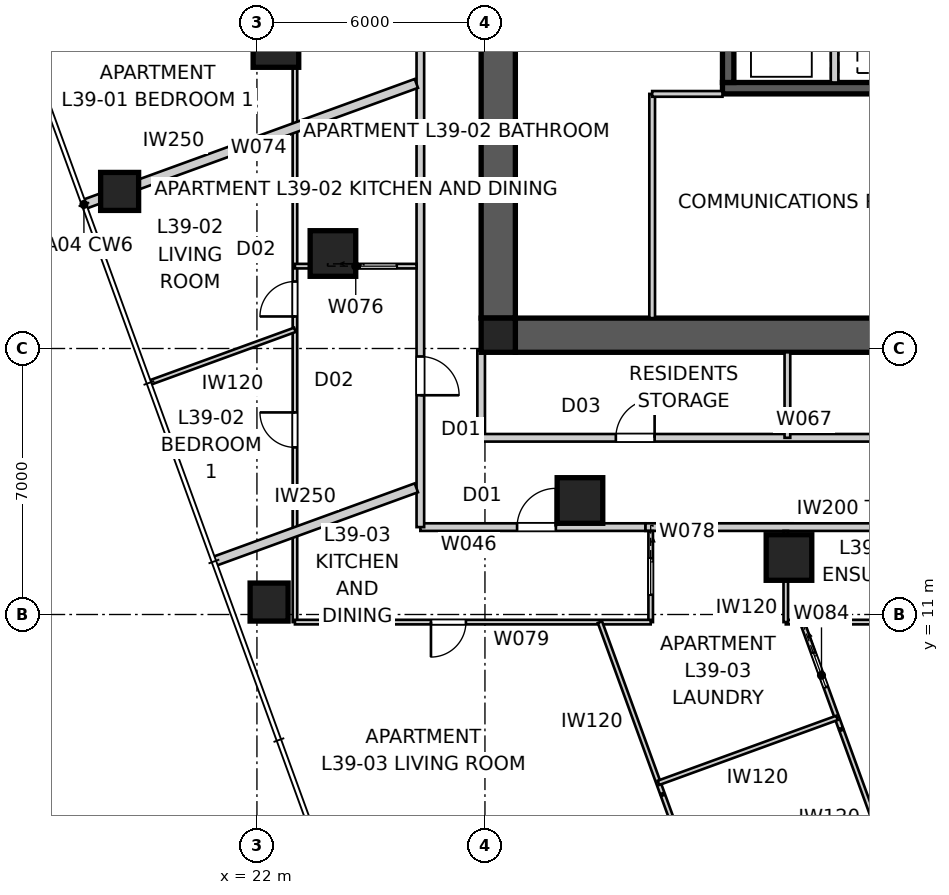
"""IFC4 building model, lengths in metres.
Left out: names, types, materials, properties, quantities, classifications, styles, units other than length and angle.
Written with IfcOpenShell. Run it as: python <this file> out.ifc"""

import sys

from ifc_helpers import new_model, si_unit, direction, frame, frame_2d, origin, origin_2d, place, context, subcontext, project, spatial, polyline, rectangle, outline, extrude, element, fill, save


model = new_model("IFC4")
c1 = context("Model", 3, precision=1e-05, world=origin(), true_north=direction((0.0, 1.0)))
c2 = subcontext(c1, "Body", "Model", "MODEL_VIEW")
j1 = project(units=[si_unit("LENGTHUNIT", "METRE"), si_unit("PLANEANGLEUNIT", "RADIAN")], contexts=[c1])
p1 = place(None, origin())
s1 = spatial("IfcSite", under=j1, at=p1, CompositionType="ELEMENT")
p2 = place(p1, origin())
s2 = spatial("IfcBuilding", under=s1, at=p2, CompositionType="ELEMENT")
p3 = place(p2, frame((0.0, 0.0, 143.8)))
s3 = spatial("IfcBuildingStorey", under=s2, at=p3, CompositionType="ELEMENT", Elevation=143.8)
p4 = place(p3, frame((51.2, 18.35, 0.0), z_axis=(0.0, 0.0, 1.0), x_axis=(-1.0, 0.0, 0.0)))
e1 = element("IfcWall", 1, at=p4, inside=s3, PredefinedType="SHEAR", context=c2, shape_type="SweptSolid", body=[
    extrude(outline(polyline([(0.0, -0.45), (22.4, -0.45), (22.4, -0.025), (22.85, -0.025), (22.85, 0.025), (22.4, 0.025), (22.4, 0.45), (0.0, 0.45), (0.0, 0.025), (-0.45, 0.025), (-0.45, -0.025), (0.0, -0.025), (0.0, -0.45)])), origin(), (0.0, 0.0, 1.0), 3.4),
])
p5 = place(p3, frame((28.35, 41.2, 0.0), z_axis=(0.0, 0.0, 1.0), x_axis=(0.0, -1.0, 0.0)))
e2 = element("IfcWall", 2, at=p5, inside=s3, PredefinedType="SHEAR", context=c2, shape_type="SweptSolid", body=[
    extrude(outline(polyline([(0.0, -0.45), (22.4, -0.45), (22.4, -0.025), (22.85, -0.025), (22.85, 0.025), (22.4, 0.025), (22.4, 0.45), (0.0, 0.45), (0.0, 0.025), (-0.45, 0.025), (-0.45, -0.025), (0.0, -0.025), (0.0, -0.45)])), origin(), (0.0, 0.0, 1.0), 3.4),
])
p6 = place(p5, frame((11.14, 0.0, 0.0)))
e3 = element("IfcOpeningElement", 3, at=p6, cuts=e2, PredefinedType="OPENING", context=c2, shape_type="SweptSolid", body=[
    extrude(rectangle(XDim=1.02, YDim=2.4, at=frame_2d((0.51, 1.2))), frame((0.0, 0.46, 0.0), z_axis=(0.0, -1.0, 0.0), x_axis=(1.0, 0.0, 0.0)), (0.0, 0.0, 1.0), 0.92),
])
p7 = place(p3, frame((45.75, 24.85, 0.0), z_axis=(0.0, 0.0, 1.0), x_axis=(-1.0, 0.0, 0.0)))
e4 = element("IfcWall", 4, at=p7, inside=s3, PredefinedType="SHEAR", context=c2, shape_type="SweptSolid", body=[
    extrude(rectangle(XDim=11.5, YDim=0.3, at=frame_2d((5.75, 0.0))), origin(), (0.0, 0.0, 1.0), 3.4),
])
p8 = place(p3, frame((37.2, 27.8, 0.0), z_axis=(0.0, 0.0, 1.0), x_axis=(0.0, -1.0, 0.0)))
e5 = element("IfcWall", 5, at=p8, inside=s3, PredefinedType="SOLIDWALL", context=c2, shape_type="SweptSolid", body=[
    extrude(rectangle(XDim=2.8, YDim=0.2, at=frame_2d((1.4, 0.0))), origin(), (0.0, 0.0, 1.0), 3.4),
])
p9 = place(p3, frame((34.4, 27.8, 0.0), z_axis=(0.0, 0.0, 1.0), x_axis=(0.0, -1.0, 0.0)))
e6 = element("IfcWall", 6, at=p9, inside=s3, PredefinedType="SHEAR", context=c2, shape_type="SweptSolid", body=[
    extrude(rectangle(XDim=2.8, YDim=0.3, at=frame_2d((1.4, 0.0))), origin(), (0.0, 0.0, 1.0), 3.4),
])
p10 = place(p3, frame((28.35, 18.35, 0.0), z_axis=(0.0, 0.0, 1.0), x_axis=(1.0, 0.0, 0.0)))
e7 = element("IfcColumn", 7, at=p10, inside=s3, PredefinedType="COLUMN", context=c2, shape_type="SweptSolid", body=[
    extrude(rectangle(XDim=0.9, YDim=0.9, at=origin_2d()), origin(), (0.0, 0.0, 1.0), 3.4),
])
for number, where, z_axis, x_axis in (
    (8, (18.387, 22.134, -0.15), (0.0, 0.0, 1.0), (1.0, 0.0, 0.0)),
    (9, (22.32, 11.327, -0.15), (0.0, 0.0, 1.0), (1.0, 0.0, 0.0)),
):
    element("IfcColumn", number, at=place(p3, frame(where, z_axis=z_axis, x_axis=x_axis)), inside=s3, PredefinedType="COLUMN", context=c2, shape_type="SweptSolid", body=[
        extrude(rectangle(XDim=1.0, YDim=1.0, at=origin_2d()), origin(), (0.0, 0.0, 1.0), 3.55),
    ])
for number, where, z_axis, x_axis in (
    (10, (22.5, 26.0, 0.0), (0.0, 0.0, 1.0), (1.0, 0.0, 0.0)),
    (11, (24.0, 20.5, 0.0), (0.0, 0.0, 1.0), (1.0, 0.0, 0.0)),
    (12, (30.5, 14.0, 0.0), (0.0, 0.0, 1.0), (1.0, 0.0, 0.0)),
    (13, (36.0, 12.5, 0.0), (0.0, 0.0, 1.0), (1.0, 0.0, 0.0)),
):
    element("IfcColumn", number, at=place(p3, frame(where, z_axis=z_axis, x_axis=x_axis)), inside=s3, PredefinedType="COLUMN", context=c2, shape_type="SweptSolid", body=[
        extrude(rectangle(XDim=1.2, YDim=1.2, at=origin_2d()), origin(), (0.0, 0.0, 1.0), 3.4),
    ])
p11 = place(p3, frame((26.3, 13.3, 0.0), z_axis=(0.0, 0.0, 1.0), x_axis=(1.0, 0.0, 0.0)))
e14 = element("IfcWall", 14, at=p11, inside=s3, PredefinedType="PARTITIONING", context=c2, shape_type="SweptSolid", body=[
    extrude(rectangle(XDim=5.925, YDim=0.2, at=frame_2d((2.962, 0.0))), origin(), (0.0, 0.0, 1.0), 3.25),
])
p12 = place(p11, frame((2.545, 0.0, 0.0)))
e15 = element("IfcOpeningElement", 15, at=p12, cuts=e14, PredefinedType="OPENING", context=c2, shape_type="SweptSolid", body=[
    extrude(rectangle(XDim=1.02, YDim=2.34, at=frame_2d((0.51, 1.17))), frame((0.0, 0.11, 0.0), z_axis=(0.0, -1.0, 0.0), x_axis=(1.0, 0.0, 0.0)), (0.0, 0.0, 1.0), 0.22),
])
p13 = place(p3, frame((32.225, 13.3, 0.0), z_axis=(0.0, 0.0, 1.0), x_axis=(1.0, 0.0, 0.0)))
e16 = element("IfcWall", 16, at=p13, inside=s3, PredefinedType="PARTITIONING", context=c2, shape_type="SweptSolid", body=[
    extrude(rectangle(XDim=1.684, YDim=0.2, at=frame_2d((0.842, 0.0))), origin(), (0.0, 0.0, 1.0), 2.55),
])
p14 = place(p3, frame((33.908, 13.3, 0.0), z_axis=(0.0, 0.0, 1.0), x_axis=(1.0, 0.0, 0.0)))
e17 = element("IfcWall", 17, at=p14, inside=s3, PredefinedType="PARTITIONING", context=c2, shape_type="SweptSolid", body=[
    extrude(rectangle(XDim=12.183, YDim=0.2, at=frame_2d((6.092, 0.0))), origin(), (0.0, 0.0, 1.0), 3.25),
])
p15 = place(p3, frame((26.3, 46.3, 0.0), z_axis=(0.0, 0.0, 1.0), x_axis=(0.0, -1.0, 0.0)))
e18 = element("IfcWall", 18, at=p15, inside=s3, PredefinedType="PARTITIONING", context=c2, shape_type="SweptSolid", body=[
    extrude(rectangle(XDim=33.0, YDim=0.2, at=frame_2d((16.5, 0.0))), origin(), (0.0, 0.0, 1.0), 3.25),
])
p16 = place(p15, frame((13.229, 0.0, 0.0)))
e19 = element("IfcOpeningElement", 19, at=p16, cuts=e18, PredefinedType="OPENING", context=c2, shape_type="SweptSolid", body=[
    extrude(rectangle(XDim=1.02, YDim=2.34, at=frame_2d((0.51, 1.17))), frame((0.0, 0.11, 0.0), z_axis=(0.0, -1.0, 0.0), x_axis=(1.0, 0.0, 0.0)), (0.0, 0.0, 1.0), 0.22),
])
p17 = place(p15, frame((28.51, 0.0, 0.0)))
e20 = element("IfcOpeningElement", 20, at=p17, cuts=e18, PredefinedType="OPENING", context=c2, shape_type="SweptSolid", body=[
    extrude(rectangle(XDim=1.02, YDim=2.34, at=frame_2d((0.51, 1.17))), frame((0.0, 0.11, 0.0), z_axis=(0.0, -1.0, 0.0), x_axis=(1.0, 0.0, 0.0)), (0.0, 0.0, 1.0), 0.22),
])
p18 = place(p15, frame((1.998, 0.0, 0.0)))
e21 = element("IfcOpeningElement", 21, at=p18, cuts=e18, PredefinedType="OPENING", context=c2, shape_type="SweptSolid", body=[
    extrude(rectangle(XDim=1.02, YDim=2.34, at=frame_2d((0.51, 1.17))), frame((0.0, 0.11, 0.0), z_axis=(0.0, -1.0, 0.0), x_axis=(1.0, 0.0, 0.0)), (0.0, 0.0, 1.0), 0.22),
])
p19 = place(p3, frame((17.447, 21.792, 0.0), z_axis=(0.0, 0.0, 1.0), x_axis=(0.939693071685, 0.342018904489, 0.0)))
e22 = element("IfcWall", 22, at=p19, inside=s3, PredefinedType="PARTITIONING", context=c2, shape_type="SweptSolid", body=[
    extrude(rectangle(XDim=9.309, YDim=0.25, at=frame_2d((4.654, 0.0))), origin(), (0.0, 0.0, 1.0), 3.25),
])
p20 = place(p3, frame((20.868, 12.395, 0.0), z_axis=(0.0, 0.0, 1.0), x_axis=(0.939690274876, 0.342026588591, 0.0)))
e23 = element("IfcWall", 23, at=p20, inside=s3, PredefinedType="PARTITIONING", context=c2, shape_type="SweptSolid", body=[
    extrude(rectangle(XDim=5.669, YDim=0.25, at=frame_2d((2.834, 0.0))), origin(), (0.0, 0.0, 1.0), 3.25),
])
p21 = place(p3, frame((32.4, 18.8, 0.0), z_axis=(0.0, 0.0, 1.0), x_axis=(0.0, 1.0, 0.0)))
e24 = element("IfcWall", 24, at=p21, inside=s3, PredefinedType="SOLIDWALL", context=c2, shape_type="SweptSolid", body=[
    extrude(rectangle(XDim=5.9, YDim=0.15, at=frame_2d((2.95, 0.0))), origin(), (0.0, 0.0, 1.0), 3.25),
])
p22 = place(p3, frame((32.4, 24.7, 0.0), z_axis=(0.0, 0.0, 1.0), x_axis=(1.0, 0.0, 0.0)))
e25 = element("IfcWall", 25, at=p22, inside=s3, PredefinedType="SOLIDWALL", context=c2, shape_type="SweptSolid", body=[
    extrude(rectangle(XDim=1.85, YDim=0.15, at=frame_2d((0.925, 0.0))), origin(), (0.0, 0.0, 1.0), 3.25),
])
p23 = place(p3, frame((27.9, 17.95, 0.0), z_axis=(0.0, 0.0, 1.0), x_axis=(0.0, -1.0, 0.0)))
e26 = element("IfcWall", 26, at=p23, inside=s3, PredefinedType="PARTITIONING", context=c2, shape_type="SweptSolid", body=[
    extrude(rectangle(XDim=2.3, YDim=0.2, at=frame_2d((1.15, 0.0))), origin(), (0.0, 0.0, 1.0), 3.25),
])
p24 = place(p3, frame((27.9, 15.65, 0.0), z_axis=(0.0, 0.0, 1.0), x_axis=(1.0, 0.0, 0.0)))
e27 = element("IfcWall", 27, at=p24, inside=s3, PredefinedType="PARTITIONING", context=c2, shape_type="SweptSolid", body=[
    extrude(rectangle(XDim=24.2, YDim=0.2, at=frame_2d((12.1, 0.0))), origin(), (0.0, 0.0, 1.0), 3.25),
])
p25 = place(p24, frame((12.437, 0.0, 0.0)))
e28 = element("IfcOpeningElement", 28, at=p25, cuts=e27, PredefinedType="OPENING", context=c2, shape_type="SweptSolid", body=[
    extrude(rectangle(XDim=1.02, YDim=2.1, at=frame_2d((0.51, 1.05))), frame((0.0, 0.11, 0.0), z_axis=(0.0, -1.0, 0.0), x_axis=(1.0, 0.0, 0.0)), (0.0, 0.0, 1.0), 0.22),
])
p26 = place(p24, frame((3.544, 0.0, 0.0)))
e29 = element("IfcOpeningElement", 29, at=p26, cuts=e27, PredefinedType="OPENING", context=c2, shape_type="SweptSolid", body=[
    extrude(rectangle(XDim=1.02, YDim=2.1, at=frame_2d((0.51, 1.05))), frame((0.0, 0.11, 0.0), z_axis=(0.0, -1.0, 0.0), x_axis=(1.0, 0.0, 0.0)), (0.0, 0.0, 1.0), 0.22),
])
p27 = place(p24, frame((19.883, 0.0, 0.0)))
e30 = element("IfcOpeningElement", 30, at=p27, cuts=e27, PredefinedType="OPENING", context=c2, shape_type="SweptSolid", body=[
    extrude(rectangle(XDim=1.02, YDim=2.1, at=frame_2d((0.51, 1.05))), frame((0.0, 0.11, 0.0), z_axis=(0.0, -1.0, 0.0), x_axis=(1.0, 0.0, 0.0)), (0.0, 0.0, 1.0), 0.22),
])
p28 = place(p3, frame((35.958, 15.65, 0.0), z_axis=(0.0, 0.0, 1.0), x_axis=(0.0, 1.0, 0.0)))
e31 = element("IfcWall", 31, at=p28, inside=s3, PredefinedType="SOLIDWALL", context=c2, shape_type="SweptSolid", body=[
    extrude(rectangle(XDim=2.25, YDim=0.15, at=frame_2d((1.125, 0.0))), origin(), (0.0, 0.0, 1.0), 3.25),
])
p29 = place(p3, frame((23.0, 10.8, 0.0), z_axis=(0.0, 0.0, 1.0), x_axis=(0.0, 1.0, 0.0)))
e32 = element("IfcWall", 32, at=p29, inside=s3, PredefinedType="PARTITIONING", context=c2, shape_type="SweptSolid", body=[
    extrude(rectangle(XDim=38.0, YDim=0.12, at=frame_2d((19.0, 0.0))), origin(), (0.0, 0.0, 1.0), 2.55),
])
p30 = place(p29, frame((20.674, 0.0, 0.0)))
e33 = element("IfcOpeningElement", 33, at=p30, cuts=e32, PredefinedType="OPENING", context=c2, shape_type="SweptSolid", body=[
    extrude(rectangle(XDim=0.92, YDim=2.34, at=frame_2d((0.46, 1.17))), frame((0.0, 0.07, 0.0), z_axis=(0.0, -1.0, 0.0), x_axis=(1.0, 0.0, 0.0)), (0.0, 0.0, 1.0), 0.14),
])
p31 = place(p29, frame((4.598, 0.0, 0.0)))
e34 = element("IfcOpeningElement", 34, at=p31, cuts=e32, PredefinedType="OPENING", context=c2, shape_type="SweptSolid", body=[
    extrude(rectangle(XDim=0.92, YDim=2.34, at=frame_2d((0.46, 1.17))), frame((0.0, 0.07, 0.0), z_axis=(0.0, -1.0, 0.0), x_axis=(1.0, 0.0, 0.0)), (0.0, 0.0, 1.0), 0.14),
])
p32 = place(p29, frame((8.043, 0.0, 0.0)))
e35 = element("IfcOpeningElement", 35, at=p32, cuts=e32, PredefinedType="OPENING", context=c2, shape_type="SweptSolid", body=[
    extrude(rectangle(XDim=0.92, YDim=2.34, at=frame_2d((0.46, 1.17))), frame((0.0, 0.07, 0.0), z_axis=(0.0, -1.0, 0.0), x_axis=(1.0, 0.0, 0.0)), (0.0, 0.0, 1.0), 0.14),
])
p33 = place(p29, frame((33.957, 0.0, 0.0)))
e36 = element("IfcOpeningElement", 36, at=p33, cuts=e32, PredefinedType="OPENING", context=c2, shape_type="SweptSolid", body=[
    extrude(rectangle(XDim=0.92, YDim=2.34, at=frame_2d((0.46, 1.17))), frame((0.0, 0.07, 0.0), z_axis=(0.0, -1.0, 0.0), x_axis=(1.0, 0.0, 0.0)), (0.0, 0.0, 1.0), 0.14),
])
p34 = place(p29, frame((26.957, 0.0, 0.0)))
e37 = element("IfcOpeningElement", 37, at=p34, cuts=e32, PredefinedType="OPENING", context=c2, shape_type="SweptSolid", body=[
    extrude(rectangle(XDim=0.96, YDim=2.1, at=frame_2d((0.48, 1.05))), frame((0.0, 0.07, 0.0), z_axis=(0.0, -1.0, 0.0), x_axis=(1.0, 0.0, 0.0)), (0.0, 0.0, 1.0), 0.14),
])
p35 = place(p3, frame((23.0, 20.167, 0.0), z_axis=(0.0, 0.0, 1.0), x_axis=(1.0, 0.0, 0.0)))
e38 = element("IfcWall", 38, at=p35, inside=s3, PredefinedType="PARTITIONING", context=c2, shape_type="SweptSolid", body=[
    extrude(rectangle(XDim=3.2, YDim=0.12, at=frame_2d((1.6, 0.0))), origin(), (0.0, 0.0, 1.0), 3.25),
])
p36 = place(p35, frame((1.72, 0.0, 0.0)))
e39 = element("IfcOpeningElement", 39, at=p36, cuts=e38, PredefinedType="OPENING", context=c2, shape_type="SweptSolid", body=[
    extrude(rectangle(XDim=0.96, YDim=2.1, at=frame_2d((0.48, 1.05))), frame((0.0, 0.07, 0.0), z_axis=(0.0, -1.0, 0.0), x_axis=(1.0, 0.0, 0.0)), (0.0, 0.0, 1.0), 0.14),
])
p37 = place(p3, frame((23.0, 18.492, 0.0), z_axis=(0.0, 0.0, 1.0), x_axis=(-0.939682468191, -0.342048036063, 0.0)))
e40 = element("IfcWall", 40, at=p37, inside=s3, PredefinedType="PARTITIONING", context=c2, shape_type="SweptSolid", body=[
    extrude(rectangle(XDim=4.049, YDim=0.12, at=frame_2d((2.024, 0.0))), origin(), (0.0, 0.0, 1.0), 3.25),
])
p38 = place(p3, frame((32.361, 13.2, 0.0), z_axis=(0.0, 0.0, 1.0), x_axis=(0.0, -1.0, 0.0)))
e41 = element("IfcWall", 41, at=p38, inside=s3, PredefinedType="PARTITIONING", context=c2, shape_type="SweptSolid", body=[
    extrude(rectangle(XDim=2.4, YDim=0.12, at=frame_2d((1.2, 0.0))), origin(), (0.0, 0.0, 1.0), 3.25),
])
p39 = place(p38, frame((0.72, 0.0, 0.0)))
e42 = element("IfcOpeningElement", 42, at=p39, cuts=e41, PredefinedType="OPENING", context=c2, shape_type="SweptSolid", body=[
    extrude(rectangle(XDim=0.96, YDim=2.1, at=frame_2d((0.48, 1.05))), frame((0.0, 0.07, 0.0), z_axis=(0.0, -1.0, 0.0), x_axis=(1.0, 0.0, 0.0)), (0.0, 0.0, 1.0), 0.14),
])
p40 = place(p3, frame((32.361, 10.8, 0.0), z_axis=(0.0, 0.0, 1.0), x_axis=(-1.0, 0.0, 0.0)))
e43 = element("IfcWall", 43, at=p40, inside=s3, PredefinedType="PARTITIONING", context=c2, shape_type="SweptSolid", body=[
    extrude(rectangle(XDim=9.361, YDim=0.12, at=frame_2d((4.681, 0.0))), origin(), (0.0, 0.0, 1.0), 3.25),
])
p41 = place(p40, frame((4.862, 0.0, 0.0)))
e44 = element("IfcOpeningElement", 44, at=p41, cuts=e43, PredefinedType="OPENING", context=c2, shape_type="SweptSolid", body=[
    extrude(rectangle(XDim=0.92, YDim=2.34, at=frame_2d((0.46, 1.17))), frame((0.0, 0.07, 0.0), z_axis=(0.0, -1.0, 0.0), x_axis=(1.0, 0.0, 0.0)), (0.0, 0.0, 1.0), 0.14),
])
p42 = place(p3, frame((53.8, 10.8, 0.0), z_axis=(0.0, 0.0, 1.0), x_axis=(-1.0, 0.0, 0.0)))
e45 = element("IfcWall", 45, at=p42, inside=s3, PredefinedType="PARTITIONING", context=c2, shape_type="SweptSolid", body=[
    extrude(rectangle(XDim=17.884, YDim=0.12, at=frame_2d((8.942, 0.0))), origin(), (0.0, 0.0, 1.0), 3.25),
])
p43 = place(p42, frame((3.665, 0.0, 0.0)))
e46 = element("IfcOpeningElement", 46, at=p43, cuts=e45, PredefinedType="OPENING", context=c2, shape_type="SweptSolid", body=[
    extrude(rectangle(XDim=0.92, YDim=2.34, at=frame_2d((0.46, 1.17))), frame((0.0, 0.07, 0.0), z_axis=(0.0, -1.0, 0.0), x_axis=(1.0, 0.0, 0.0)), (0.0, 0.0, 1.0), 0.14),
])
p44 = place(p42, frame((14.497, 0.0, 0.0)))
e47 = element("IfcOpeningElement", 47, at=p44, cuts=e45, PredefinedType="OPENING", context=c2, shape_type="SweptSolid", body=[
    extrude(rectangle(XDim=0.96, YDim=2.1, at=frame_2d((0.48, 1.05))), frame((0.0, 0.07, 0.0), z_axis=(0.0, -1.0, 0.0), x_axis=(1.0, 0.0, 0.0)), (0.0, 0.0, 1.0), 0.14),
])
p45 = place(p3, frame((35.916, 10.8, 0.0), z_axis=(0.0, 0.0, 1.0), x_axis=(0.0, 1.0, 0.0)))
e48 = element("IfcWall", 48, at=p45, inside=s3, PredefinedType="PARTITIONING", context=c2, shape_type="SweptSolid", body=[
    extrude(rectangle(XDim=2.4, YDim=0.12, at=frame_2d((1.2, 0.0))), origin(), (0.0, 0.0, 1.0), 3.25),
])
p46 = place(p3, frame((32.666, 6.292, 0.0), z_axis=(0.0, 0.0, 1.0), x_axis=(-0.341988220281, 0.93970423921, 0.0)))
e49 = element("IfcWall", 49, at=p46, inside=s3, PredefinedType="PARTITIONING", context=c2, shape_type="SweptSolid", body=[
    extrude(rectangle(XDim=4.797, YDim=0.12, at=frame_2d((2.399, 0.0))), origin(), (0.0, 0.0, 1.0), 3.25),
])
p47 = place(p3, frame((36.346, 10.8, 0.0), z_axis=(0.0, 0.0, 1.0), x_axis=(0.341986632257, -0.939704817141, 0.0)))
e50 = element("IfcWall", 50, at=p47, inside=s3, PredefinedType="PARTITIONING", context=c2, shape_type="SweptSolid", body=[
    extrude(rectangle(XDim=2.978, YDim=0.12, at=frame_2d((1.489, 0.0))), origin(), (0.0, 0.0, 1.0), 3.25),
])
p48 = place(p47, frame((0.861, 0.0, 0.0)))
e51 = element("IfcOpeningElement", 51, at=p48, cuts=e50, PredefinedType="OPENING", context=c2, shape_type="SweptSolid", body=[
    extrude(rectangle(XDim=0.96, YDim=2.1, at=frame_2d((0.48, 1.05))), frame((0.0, 0.07, 0.0), z_axis=(0.0, -1.0, 0.0), x_axis=(1.0, 0.0, 0.0)), (0.0, 0.0, 1.0), 0.14),
])
p49 = place(p3, frame((37.264, 8.28, 0.0), z_axis=(0.0, 0.0, 1.0), x_axis=(-0.939686455819, -0.342037080957, 0.0)))
e52 = element("IfcWall", 52, at=p49, inside=s3, PredefinedType="PARTITIONING", context=c2, shape_type="SweptSolid", body=[
    extrude(rectangle(XDim=5.0, YDim=0.12, at=frame_2d((2.5, 0.0))), origin(), (0.0, 0.0, 1.0), 3.25),
])
p50 = place(p3, frame((32.685, 6.241, 0.0), z_axis=(0.0, 0.0, 1.0), x_axis=(0.342036918442, -0.939686514973, 0.0)))
e53 = element("IfcWall", 53, at=p50, inside=s3, PredefinedType="PARTITIONING", context=c2, shape_type="SweptSolid", body=[
    extrude(rectangle(XDim=4.136, YDim=0.12, at=frame_2d((2.068, 0.0))), origin(), (0.0, 0.0, 1.0), 3.25),
])
p51 = place(p50, frame((1.608, 0.0, 0.0)))
e54 = element("IfcOpeningElement", 54, at=p51, cuts=e53, PredefinedType="OPENING", context=c2, shape_type="SweptSolid", body=[
    extrude(rectangle(XDim=0.96, YDim=2.1, at=frame_2d((0.48, 1.05))), frame((0.0, 0.07, 0.0), z_axis=(0.0, -1.0, 0.0), x_axis=(1.0, 0.0, 0.0)), (0.0, 0.0, 1.0), 0.14),
])
p52 = place(p3, frame((38.798, 4.065, 0.0), z_axis=(0.0, 0.0, 1.0), x_axis=(-0.342036918442, 0.939686514973, 0.0)))
e55 = element("IfcWall", 55, at=p52, inside=s3, PredefinedType="PARTITIONING", context=c2, shape_type="SweptSolid", body=[
    extrude(rectangle(XDim=4.136, YDim=0.12, at=frame_2d((2.068, 0.0))), origin(), (0.0, 0.0, 1.0), 3.25),
])
p53 = place(p26, origin())
e56 = element("IfcDoor", 56, at=p53, inside=s3, OperationType="SINGLE_SWING_RIGHT", PredefinedType="DOOR", context=c2, shape_type="SweptSolid", body=[
    extrude(rectangle(XDim=1.02, YDim=2.1, at=frame_2d((0.51, 1.05))), frame((0.0, 0.025, 0.0), z_axis=(0.0, -1.0, 0.0), x_axis=(1.0, 0.0, 0.0)), (0.0, 0.0, 1.0), 0.05),
])
fill(e29, e56)
p54 = place(p17, origin())
e57 = element("IfcDoor", 57, at=p54, inside=s3, OperationType="SINGLE_SWING_RIGHT", PredefinedType="DOOR", context=c2, shape_type="SweptSolid", body=[
    extrude(rectangle(XDim=1.02, YDim=2.34, at=frame_2d((0.51, 1.17))), frame((0.0, 0.025, 0.0), z_axis=(0.0, -1.0, 0.0), x_axis=(1.0, 0.0, 0.0)), (0.0, 0.0, 1.0), 0.05),
])
fill(e20, e57)
p55 = place(p12, origin())
e58 = element("IfcDoor", 58, at=p55, inside=s3, OperationType="SINGLE_SWING_RIGHT", PredefinedType="DOOR", context=c2, shape_type="SweptSolid", body=[
    extrude(rectangle(XDim=1.02, YDim=2.34, at=frame_2d((0.51, 1.17))), frame((0.0, 0.025, 0.0), z_axis=(0.0, -1.0, 0.0), x_axis=(1.0, 0.0, 0.0)), (0.0, 0.0, 1.0), 0.05),
])
fill(e15, e58)
p56 = place(p31, origin())
e59 = element("IfcDoor", 59, at=p56, inside=s3, OperationType="SINGLE_SWING_RIGHT", PredefinedType="DOOR", context=c2, shape_type="SweptSolid", body=[
    extrude(rectangle(XDim=0.92, YDim=2.34, at=frame_2d((0.46, 1.17))), frame((0.0, 0.025, 0.0), z_axis=(0.0, -1.0, 0.0), x_axis=(1.0, 0.0, 0.0)), (0.0, 0.0, 1.0), 0.05),
])
fill(e34, e59)
p57 = place(p36, origin())
e60 = element("IfcDoor", 60, at=p57, inside=s3, OperationType="SLIDING_TO_LEFT", PredefinedType="DOOR", context=c2, shape_type="SweptSolid", body=[
    extrude(rectangle(XDim=0.96, YDim=2.1, at=frame_2d((0.48, 1.05))), frame((0.0, 0.025, 0.0), z_axis=(0.0, -1.0, 0.0), x_axis=(1.0, 0.0, 0.0)), (0.0, 0.0, 1.0), 0.05),
])
fill(e39, e60)
p58 = place(p32, origin())
e61 = element("IfcDoor", 61, at=p58, inside=s3, OperationType="SINGLE_SWING_LEFT", PredefinedType="DOOR", context=c2, shape_type="SweptSolid", body=[
    extrude(rectangle(XDim=0.92, YDim=2.34, at=frame_2d((0.46, 1.17))), frame((0.0, 0.025, 0.0), z_axis=(0.0, -1.0, 0.0), x_axis=(1.0, 0.0, 0.0)), (0.0, 0.0, 1.0), 0.05),
])
fill(e35, e61)
p59 = place(p41, origin())
e62 = element("IfcDoor", 62, at=p59, inside=s3, OperationType="SINGLE_SWING_RIGHT", PredefinedType="DOOR", context=c2, shape_type="SweptSolid", body=[
    extrude(rectangle(XDim=0.92, YDim=2.34, at=frame_2d((0.46, 1.17))), frame((0.0, 0.025, 0.0), z_axis=(0.0, -1.0, 0.0), x_axis=(1.0, 0.0, 0.0)), (0.0, 0.0, 1.0), 0.05),
])
fill(e44, e62)
p60 = place(p39, origin())
e63 = element("IfcDoor", 63, at=p60, inside=s3, OperationType="SLIDING_TO_LEFT", PredefinedType="DOOR", context=c2, shape_type="SweptSolid", body=[
    extrude(rectangle(XDim=0.96, YDim=2.1, at=frame_2d((0.48, 1.05))), frame((0.0, 0.025, 0.0), z_axis=(0.0, -1.0, 0.0), x_axis=(1.0, 0.0, 0.0)), (0.0, 0.0, 1.0), 0.05),
])
fill(e42, e63)
p61 = place(p48, origin())
e64 = element("IfcDoor", 64, at=p61, inside=s3, OperationType="SLIDING_TO_LEFT", PredefinedType="DOOR", context=c2, shape_type="SweptSolid", body=[
    extrude(rectangle(XDim=0.96, YDim=2.1, at=frame_2d((0.48, 1.05))), frame((0.0, 0.025, 0.0), z_axis=(0.0, -1.0, 0.0), x_axis=(1.0, 0.0, 0.0)), (0.0, 0.0, 1.0), 0.05),
])
fill(e51, e64)
save(model, sys.argv[1])
